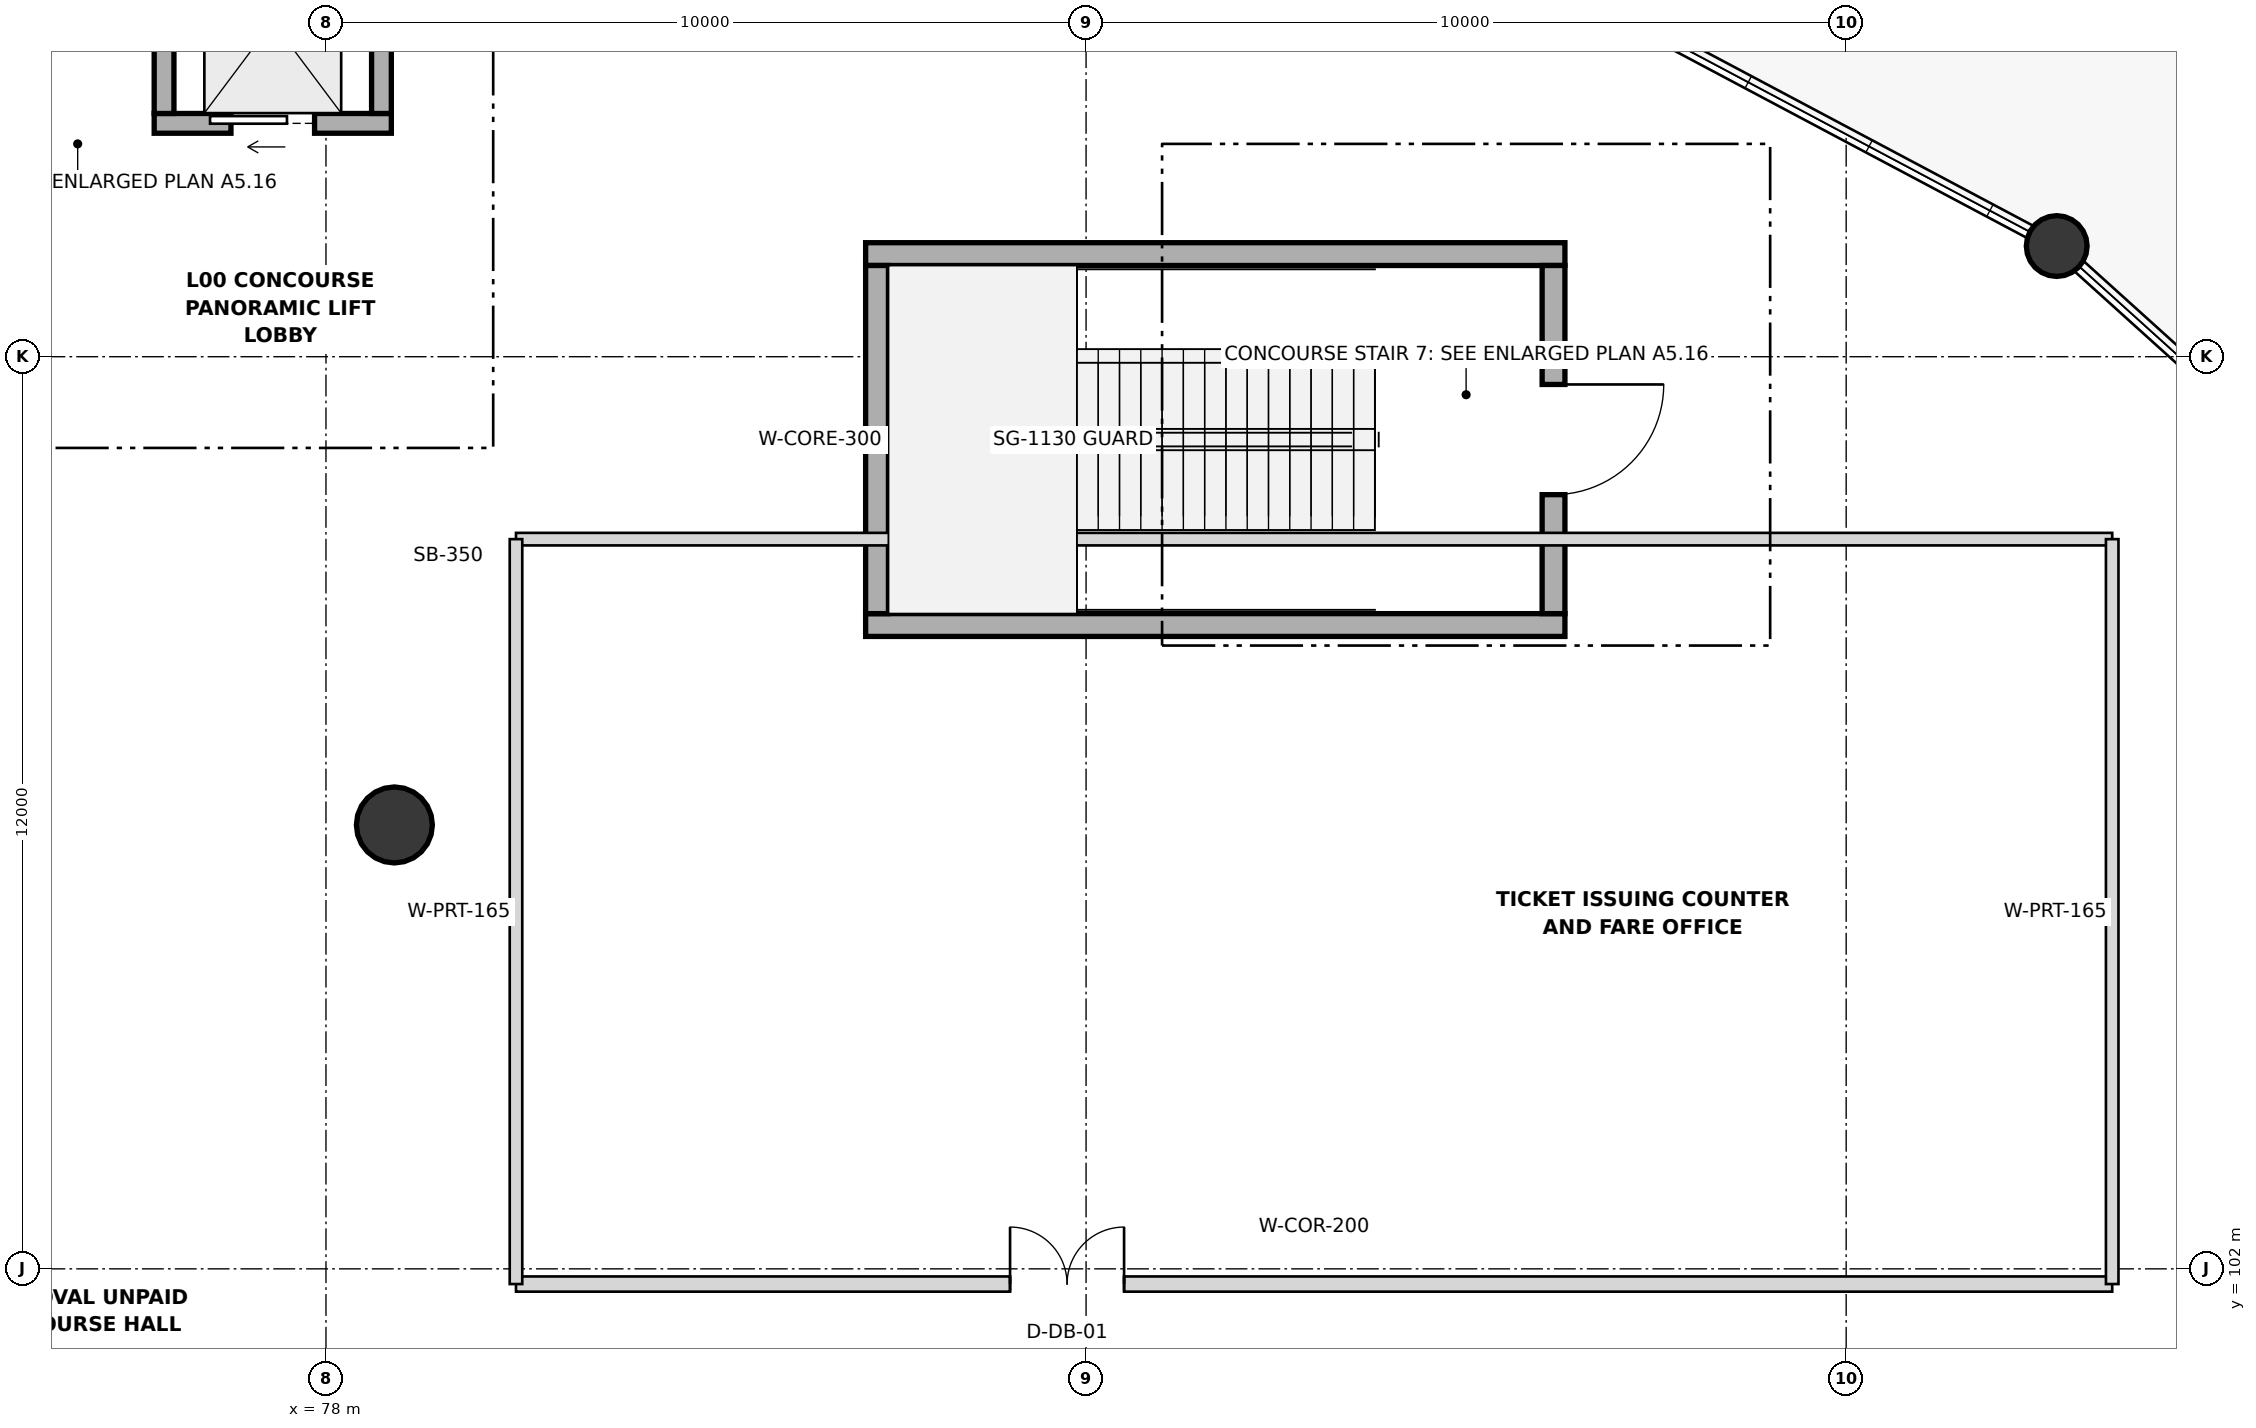
"""IFC4 building model, lengths in metres.
Left out: names, types, materials, properties, quantities, classifications, styles, units other than length and angle.
Written with IfcOpenShell. Run it as: python <this file> out.ifc"""

import sys

from ifc_helpers import new_model, si_unit, direction, frame, frame_2d, origin, origin_2d, place, context, subcontext, project, spatial, rectangle, circle, extrude, element, fill, save


model = new_model("IFC4")
c1 = context("Model", 3, precision=1e-05, world=origin(), true_north=direction((0.0, 1.0)))
c2 = subcontext(c1, "Body", "Model", "MODEL_VIEW")
j1 = project(units=[si_unit("LENGTHUNIT", "METRE"), si_unit("PLANEANGLEUNIT", "RADIAN")], contexts=[c1])
p1 = place(None, origin())
s1 = spatial("IfcSite", under=j1, at=p1, CompositionType="ELEMENT")
p2 = place(p1, origin())
s2 = spatial("IfcBuilding", under=s1, at=p2, CompositionType="ELEMENT")
p3 = place(p2, origin())
s3 = spatial("IfcBuildingStorey", under=s2, at=p3, CompositionType="ELEMENT", Elevation=0.0)
p4 = place(p3, frame((100.77, 115.456, 0.0), z_axis=(0.0, 0.0, 1.0), x_axis=(1.0, 0.0, 0.0)))
e1 = element("IfcColumn", 1, at=p4, inside=s3, PredefinedType="COLUMN", context=c2, shape_type="SweptSolid", body=[
    extrude(circle(Radius=0.4, at=origin_2d()), origin(), (0.0, 0.0, 1.0), 5.4),
])
p5 = place(p3, frame((78.9, 107.84, 0.0), z_axis=(0.0, 0.0, 1.0), x_axis=(1.0, 0.0, 0.0)))
e2 = element("IfcColumn", 2, at=p5, inside=s3, PredefinedType="COLUMN", context=c2, shape_type="SweptSolid", body=[
    extrude(circle(Radius=0.5, at=origin_2d()), origin(), (0.0, 0.0, 1.0), 5.4),
])
for number, where, z_axis, x_axis in (
    (3, (94.3, 110.47, 0.0), (0.0, 0.0, 1.0), (-1.0, 0.0, 0.0)),
    (4, (85.1, 115.35, 0.0), (0.0, 0.0, 1.0), (1.0, 0.0, 0.0)),
):
    element("IfcWall", number, at=place(p3, frame(where, z_axis=z_axis, x_axis=x_axis)), inside=s3, PredefinedType="SHEAR", context=c2, shape_type="SweptSolid", body=[
        extrude(rectangle(XDim=9.2, YDim=0.3, at=frame_2d((4.6, 0.0))), origin(), (0.0, 0.0, 1.0), 5.4),
    ])
p6 = place(p3, frame((94.15, 115.2, 0.0), z_axis=(0.0, 0.0, 1.0), x_axis=(0.0, -1.0, 0.0)))
e5 = element("IfcWall", 5, at=p6, inside=s3, PredefinedType="SHEAR", context=c2, shape_type="SweptSolid", body=[
    extrude(rectangle(XDim=4.58, YDim=0.3, at=frame_2d((2.29, 0.0))), origin(), (0.0, 0.0, 1.0), 5.4),
])
p7 = place(p6, frame((1.565, 0.0, 0.0)))
e6 = element("IfcOpeningElement", 6, at=p7, cuts=e5, PredefinedType="OPENING", context=c2, shape_type="SweptSolid", body=[
    extrude(rectangle(XDim=1.45, YDim=2.2, at=frame_2d((0.725, 1.1))), frame((0.0, 0.16, 0.0), z_axis=(0.0, -1.0, 0.0), x_axis=(1.0, 0.0, 0.0)), (0.0, 0.0, 1.0), 0.32),
])
p8 = place(p3, frame((85.25, 110.62, 0.0), z_axis=(0.0, 0.0, 1.0), x_axis=(0.0, 1.0, 0.0)))
e7 = element("IfcWall", 7, at=p8, inside=s3, PredefinedType="SHEAR", context=c2, shape_type="SweptSolid", body=[
    extrude(rectangle(XDim=4.58, YDim=0.3, at=frame_2d((2.29, 0.0))), origin(), (0.0, 0.0, 1.0), 5.4),
])
p9 = place(p3, frame((75.74, 117.07, 0.0), z_axis=(0.0, 0.0, 1.0), x_axis=(1.0, 0.0, 0.0)))
e8 = element("IfcWall", 8, at=p9, inside=s3, PredefinedType="SHEAR", context=c2, shape_type="SweptSolid", body=[
    extrude(rectangle(XDim=3.12, YDim=0.26, at=frame_2d((1.56, 0.0))), origin(), (0.0, 0.0, 1.0), 5.4),
])
p10 = place(p9, frame((1.01, 0.0, 0.0)))
e9 = element("IfcOpeningElement", 9, at=p10, cuts=e8, PredefinedType="OPENING", context=c2, shape_type="SweptSolid", body=[
    extrude(rectangle(XDim=1.1, YDim=2.15, at=frame_2d((0.55, 1.075))), frame((0.0, 0.14, 0.0), z_axis=(0.0, -1.0, 0.0), x_axis=(1.0, 0.0, 0.0)), (0.0, 0.0, 1.0), 0.28),
])
for number, where, z_axis, x_axis in (
    (10, (75.87, 117.2, 0.0), (0.0, 0.0, 1.0), (0.0, 1.0, 0.0)),
    (11, (78.73, 117.2, 0.0), (0.0, 0.0, 1.0), (0.0, 1.0, 0.0)),
):
    element("IfcWall", number, at=place(p3, frame(where, z_axis=z_axis, x_axis=x_axis)), inside=s3, PredefinedType="SHEAR", context=c2, shape_type="SweptSolid", body=[
        extrude(rectangle(XDim=3.0, YDim=0.26, at=frame_2d((1.5, 0.0))), origin(), (0.0, 0.0, 1.0), 5.4),
    ])
p11 = place(p3, frame((80.5, 101.8, 0.0), z_axis=(0.0, 0.0, 1.0), x_axis=(1.0, 0.0, 0.0)))
e12 = element("IfcWall", 12, at=p11, inside=s3, PredefinedType="PARTITIONING", context=c2, shape_type="SweptSolid", body=[
    extrude(rectangle(XDim=21.0, YDim=0.2, at=frame_2d((10.5, 0.0))), origin(), (0.0, 0.0, 1.0), 3.55),
])
p12 = place(p11, frame((6.5, 0.0, 0.0)))
e13 = element("IfcOpeningElement", 13, at=p12, cuts=e12, PredefinedType="OPENING", context=c2, shape_type="SweptSolid", body=[
    extrude(rectangle(XDim=1.5, YDim=2.15, at=frame_2d((0.75, 1.075))), frame((0.0, 0.11, 0.0), z_axis=(0.0, -1.0, 0.0), x_axis=(1.0, 0.0, 0.0)), (0.0, 0.0, 1.0), 0.22),
])
p13 = place(p3, frame((80.5, 111.6, 0.0), z_axis=(0.0, 0.0, 1.0), x_axis=(1.0, 0.0, 0.0)))
e14 = element("IfcWall", 14, at=p13, inside=s3, PredefinedType="PARTITIONING", context=c2, shape_type="SweptSolid", body=[
    extrude(rectangle(XDim=21.0, YDim=0.165, at=frame_2d((10.5, 0.0))), origin(), (0.0, 0.0, 1.0), 3.55),
])
for number, where, z_axis, x_axis in (
    (15, (80.5, 101.8, 0.0), (0.0, 0.0, 1.0), (0.0, 1.0, 0.0)),
    (16, (101.5, 101.8, 0.0), (0.0, 0.0, 1.0), (0.0, 1.0, 0.0)),
):
    element("IfcWall", number, at=place(p3, frame(where, z_axis=z_axis, x_axis=x_axis)), inside=s3, PredefinedType="PARTITIONING", context=c2, shape_type="SweptSolid", body=[
        extrude(rectangle(XDim=9.8, YDim=0.165, at=frame_2d((4.9, 0.0))), origin(), (0.0, 0.0, 1.0), 3.55),
    ])
p14 = place(p7, origin())
e17 = element("IfcDoor", 17, at=p14, inside=s3, OperationType="SINGLE_SWING_LEFT", PredefinedType="DOOR", context=c2, shape_type="SweptSolid", body=[
    extrude(rectangle(XDim=1.45, YDim=2.2, at=frame_2d((0.725, 1.1))), frame((0.0, 0.025, 0.0), z_axis=(0.0, -1.0, 0.0), x_axis=(1.0, 0.0, 0.0)), (0.0, 0.0, 1.0), 0.05),
])
fill(e6, e17)
p15 = place(p10, origin())
e18 = element("IfcDoor", 18, at=p15, inside=s3, OperationType="SLIDING_TO_LEFT", PredefinedType="DOOR", context=c2, shape_type="SweptSolid", body=[
    extrude(rectangle(XDim=1.1, YDim=2.15, at=frame_2d((0.55, 1.075))), frame((0.0, 0.025, 0.0), z_axis=(0.0, -1.0, 0.0), x_axis=(1.0, 0.0, 0.0)), (0.0, 0.0, 1.0), 0.05),
])
fill(e9, e18)
p16 = place(p12, origin())
e19 = element("IfcDoor", 19, at=p16, inside=s3, OperationType="DOUBLE_DOOR_SINGLE_SWING", PredefinedType="DOOR", context=c2, shape_type="SweptSolid", body=[
    extrude(rectangle(XDim=1.5, YDim=2.15, at=frame_2d((0.75, 1.075))), frame((0.0, 0.025, 0.0), z_axis=(0.0, -1.0, 0.0), x_axis=(1.0, 0.0, 0.0)), (0.0, 0.0, 1.0), 0.05),
])
fill(e13, e19)
save(model, sys.argv[1])
